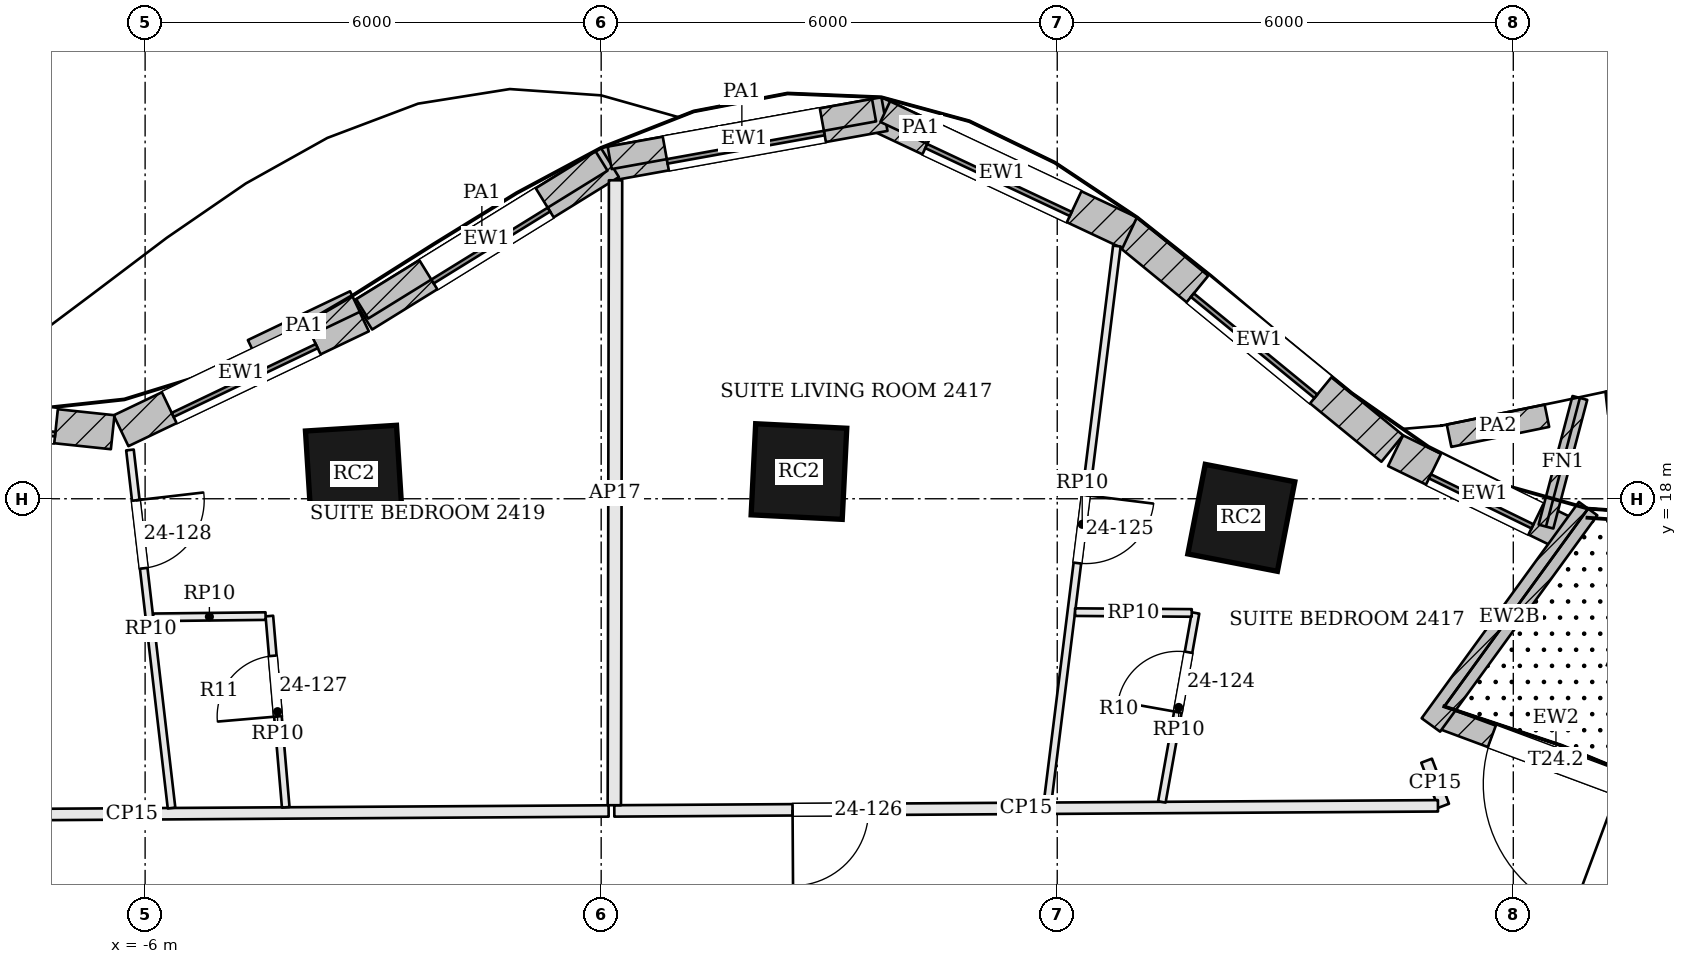
"""IFC4 building model, lengths in metres.
Left out: names, types, materials, properties, quantities, classifications, styles, units other than length and angle.
Written with IfcOpenShell. Run it as: python <this file> out.ifc"""

import sys

from ifc_helpers import new_model, si_unit, direction, frame, frame_2d, origin, origin_2d, place, context, subcontext, project, spatial, rectangle, extrude, element, fill, save


model = new_model("IFC4")
c1 = context("Model", 3, precision=1e-05, world=origin(), true_north=direction((0.0, 1.0)))
c2 = subcontext(c1, "Body", "Model", "MODEL_VIEW")
j1 = project(units=[si_unit("LENGTHUNIT", "METRE"), si_unit("PLANEANGLEUNIT", "RADIAN")], contexts=[c1])
p1 = place(None, origin())
s1 = spatial("IfcSite", under=j1, at=p1, CompositionType="ELEMENT")
p2 = place(p1, origin())
s2 = spatial("IfcBuilding", under=s1, at=p2, CompositionType="ELEMENT")
p3 = place(p2, frame((0.0, 0.0, 103.2)))
s3 = spatial("IfcBuildingStorey", under=s2, at=p3, CompositionType="ELEMENT", Elevation=103.2)
for number, where, z_axis, x_axis in (
    (1, (8.422, 17.749, 0.0), (0.0, 0.0, 1.0), (-0.982, 0.191, 0.0)),
    (2, (2.602, 18.358, 0.0), (0.0, 0.0, 1.0), (-0.999, 0.05, 0.0)),
    (3, (-3.254, 18.33, 0.0), (0.0, 0.0, 1.0), (-0.998, -0.063, 0.0)),
):
    element("IfcColumn", number, at=place(p3, frame(where, z_axis=z_axis, x_axis=x_axis)), inside=s3, PredefinedType="COLUMN", context=c2, shape_type="SweptSolid", body=[
        extrude(rectangle(XDim=1.2, YDim=1.2, at=origin_2d()), origin(), (0.0, 0.0, 1.0), 3.6),
    ])
p4 = place(p3, frame((14.083, 13.994, 0.0), z_axis=(0.0, 0.0, 1.0), x_axis=(-0.937240711156, 0.348683021312, 0.0)))
e4 = element("IfcWall", 4, at=p4, inside=s3, PredefinedType="SOLIDWALL", context=c2, shape_type="SweptSolid", body=[
    extrude(rectangle(XDim=3.247, YDim=0.3, at=frame_2d((1.624, 0.0))), origin(), (0.0, 0.0, 1.0), 3.05),
])
p5 = place(p4, frame((0.723, 0.0, 0.0)))
e5 = element("IfcOpeningElement", 5, at=p5, cuts=e4, PredefinedType="OPENING", context=c2, shape_type="SweptSolid", body=[
    extrude(rectangle(XDim=1.8, YDim=2.4, at=frame_2d((0.9, 1.2))), frame((0.0, 0.16, 0.0), z_axis=(0.0, -1.0, 0.0), x_axis=(1.0, 0.0, 0.0)), (0.0, 0.0, 1.0), 0.32),
])
p6 = place(p3, frame((12.797, 17.488, 0.0), z_axis=(0.0, 0.0, 1.0), x_axis=(-0.898632684134, 0.43870183383, 0.0)))
e6 = element("IfcWall", 6, at=p6, inside=s3, PredefinedType="SOLIDWALL", context=c2, shape_type="SweptSolid", body=[
    extrude(rectangle(XDim=2.611, YDim=0.45, at=frame_2d((1.305, 0.0))), origin(), (0.0, 0.0, 1.0), 3.4),
])
p7 = place(p6, frame((0.555, 0.0, 0.9)))
e7 = element("IfcOpeningElement", 7, at=p7, cuts=e6, PredefinedType="OPENING", context=c2, shape_type="SweptSolid", body=[
    extrude(rectangle(XDim=1.5, YDim=2.0, at=frame_2d((0.75, 1.0))), frame((0.0, 0.235, 0.0), z_axis=(0.0, -1.0, 0.0), x_axis=(1.0, 0.0, 0.0)), (0.0, 0.0, 1.0), 0.47),
])
p8 = place(p3, frame((10.407, 18.661, 0.0), z_axis=(0.0, 0.0, 1.0), x_axis=(-0.773702458947, 0.633549133864, 0.0)))
e8 = element("IfcWall", 8, at=p8, inside=s3, PredefinedType="SOLIDWALL", context=c2, shape_type="SweptSolid", body=[
    extrude(rectangle(XDim=4.526, YDim=0.45, at=frame_2d((2.263, 0.0))), origin(), (0.0, 0.0, 1.0), 3.4),
])
p9 = place(p8, frame((1.213, 0.0, 0.9)))
e9 = element("IfcOpeningElement", 9, at=p9, cuts=e8, PredefinedType="OPENING", context=c2, shape_type="SweptSolid", body=[
    extrude(rectangle(XDim=2.1, YDim=2.0, at=frame_2d((1.05, 1.0))), frame((0.0, 0.235, 0.0), z_axis=(0.0, -1.0, 0.0), x_axis=(1.0, 0.0, 0.0)), (0.0, 0.0, 1.0), 0.47),
])
p10 = place(p3, frame((6.953, 21.499, 0.0), z_axis=(0.0, 0.0, 1.0), x_axis=(-0.905034581957, 0.425337989676, 0.0)))
e10 = element("IfcWall", 10, at=p10, inside=s3, PredefinedType="SOLIDWALL", context=c2, shape_type="SweptSolid", body=[
    extrude(rectangle(XDim=3.714, YDim=0.45, at=frame_2d((1.857, 0.0))), origin(), (0.0, 0.0, 1.0), 3.4),
])
p11 = place(p10, frame((0.807, 0.0, 0.9)))
e11 = element("IfcOpeningElement", 11, at=p11, cuts=e10, PredefinedType="OPENING", context=c2, shape_type="SweptSolid", body=[
    extrude(rectangle(XDim=2.1, YDim=2.0, at=frame_2d((1.05, 1.0))), frame((0.0, 0.235, 0.0), z_axis=(0.0, -1.0, 0.0), x_axis=(1.0, 0.0, 0.0)), (0.0, 0.0, 1.0), 0.47),
])
p12 = place(p3, frame((3.727, 23.061, 0.0), z_axis=(0.0, 0.0, 1.0), x_axis=(-0.984119180424, -0.177508982087, 0.0)))
e12 = element("IfcWall", 12, at=p12, inside=s3, PredefinedType="SOLIDWALL", context=c2, shape_type="SweptSolid", body=[
    extrude(rectangle(XDim=3.747, YDim=0.45, at=frame_2d((1.873, 0.0))), origin(), (0.0, 0.0, 1.0), 3.4),
])
p13 = place(p12, frame((0.823, 0.0, 0.9)))
e13 = element("IfcOpeningElement", 13, at=p13, cuts=e12, PredefinedType="OPENING", context=c2, shape_type="SweptSolid", body=[
    extrude(rectangle(XDim=2.1, YDim=2.0, at=frame_2d((1.05, 1.0))), frame((0.0, 0.235, 0.0), z_axis=(0.0, -1.0, 0.0), x_axis=(1.0, 0.0, 0.0)), (0.0, 0.0, 1.0), 0.47),
])
p14 = place(p3, frame((0.115, 22.424, 0.0), z_axis=(0.0, 0.0, 1.0), x_axis=(-0.8506970368, -0.525656305564, 0.0)))
e14 = element("IfcWall", 14, at=p14, inside=s3, PredefinedType="SOLIDWALL", context=c2, shape_type="SweptSolid", body=[
    extrude(rectangle(XDim=3.816, YDim=0.45, at=frame_2d((1.908, 0.0))), origin(), (0.0, 0.0, 1.0), 3.4),
])
p15 = place(p14, frame((1.008, 0.0, 0.9)))
e15 = element("IfcOpeningElement", 15, at=p15, cuts=e14, PredefinedType="OPENING", context=c2, shape_type="SweptSolid", body=[
    extrude(rectangle(XDim=1.8, YDim=2.0, at=frame_2d((0.9, 1.0))), frame((0.0, 0.235, 0.0), z_axis=(0.0, -1.0, 0.0), x_axis=(1.0, 0.0, 0.0)), (0.0, 0.0, 1.0), 0.47),
])
p16 = place(p3, frame((-3.154, 20.406, 0.0), z_axis=(0.0, 0.0, 1.0), x_axis=(-0.902333313, -0.431038968367, 0.0)))
e16 = element("IfcWall", 16, at=p16, inside=s3, PredefinedType="SOLIDWALL", context=c2, shape_type="SweptSolid", body=[
    extrude(rectangle(XDim=3.505, YDim=0.45, at=frame_2d((1.753, 0.0))), origin(), (0.0, 0.0, 1.0), 3.4),
])
p17 = place(p16, frame((0.703, 0.0, 0.9)))
e17 = element("IfcOpeningElement", 17, at=p17, cuts=e16, PredefinedType="OPENING", context=c2, shape_type="SweptSolid", body=[
    extrude(rectangle(XDim=2.1, YDim=2.0, at=frame_2d((1.05, 1.0))), frame((0.0, 0.235, 0.0), z_axis=(0.0, -1.0, 0.0), x_axis=(1.0, 0.0, 0.0)), (0.0, 0.0, 1.0), 0.47),
])
p18 = place(p3, frame((-6.427, 18.875, 0.0), z_axis=(0.0, 0.0, 1.0), x_axis=(-0.994433468803, 0.10536638992, 0.0)))
e18 = element("IfcWall", 18, at=p18, inside=s3, PredefinedType="SOLIDWALL", context=c2, shape_type="SweptSolid", body=[
    extrude(rectangle(XDim=3.598, YDim=0.45, at=frame_2d((1.799, 0.0))), origin(), (0.0, 0.0, 1.0), 3.4),
])
p19 = place(p18, frame((0.749, 0.0, 0.9)))
e19 = element("IfcOpeningElement", 19, at=p19, cuts=e18, PredefinedType="OPENING", context=c2, shape_type="SweptSolid", body=[
    extrude(rectangle(XDim=2.1, YDim=2.0, at=frame_2d((1.05, 1.0))), frame((0.0, 0.235, 0.0), z_axis=(0.0, -1.0, 0.0), x_axis=(1.0, 0.0, 0.0)), (0.0, 0.0, 1.0), 0.47),
])
p20 = place(p3, frame((12.43, 17.634, 0.0), z_axis=(0.0, 0.0, 1.0), x_axis=(0.254987624184, 0.966944316656, 0.0)))
e20 = element("IfcWall", 20, at=p20, inside=s3, PredefinedType="SOLIDWALL", context=c2, shape_type="SweptSolid", body=[
    extrude(rectangle(XDim=1.75, YDim=0.2, at=frame_2d((0.875, 0.0))), origin(), (0.0, 0.0, 1.0), 3.4),
])
p21 = place(p3, frame((12.984, 17.87, 0.0), z_axis=(0.0, 0.0, 1.0), x_axis=(-0.587940596791, -0.8089041072, 0.0)))
e21 = element("IfcWall", 21, at=p21, inside=s3, PredefinedType="SOLIDWALL", context=c2, shape_type="SweptSolid", body=[
    extrude(rectangle(XDim=3.518, YDim=0.3, at=frame_2d((1.759, 0.0))), origin(), (0.0, 0.0, 1.0), 2.954),
])
p22 = place(p3, frame((11.155, 18.829, 0.0), z_axis=(0.0, 0.0, 1.0), x_axis=(0.97969170857, 0.200509740809, 0.0)))
e22 = element("IfcWall", 22, at=p22, inside=s3, PredefinedType="PARAPET", context=c2, shape_type="SweptSolid", body=[
    extrude(rectangle(XDim=1.314, YDim=0.3, at=frame_2d((0.657, 0.0))), origin(), (0.0, 0.0, 1.0), 1.1),
])
p23 = place(p3, frame((13.229, 19.259, 0.0), z_axis=(0.0, 0.0, 1.0), x_axis=(0.993648609004, 0.112527515859, 0.0)))
e23 = element("IfcWall", 23, at=p23, inside=s3, PredefinedType="PARAPET", context=c2, shape_type="SweptSolid", body=[
    extrude(rectangle(XDim=3.426, YDim=0.3, at=frame_2d((1.713, 0.0))), origin(), (0.0, 0.0, 1.0), 1.1),
])
p24 = place(p3, frame((4.667, 22.656, 3.6), z_axis=(0.0, 0.0, 1.0), x_axis=(-0.905050240273, 0.425304670304, 0.0)))
e24 = element("IfcWall", 24, at=p24, inside=s3, PredefinedType="PARAPET", context=c2, shape_type="SweptSolid", body=[
    extrude(rectangle(XDim=1.027, YDim=0.3, at=frame_2d((0.513, 0.0))), origin(), (0.0, 0.0, 1.0), 1.1),
])
p25 = place(p3, frame((3.59, 23.112, 3.6), z_axis=(0.0, 0.0, 1.0), x_axis=(-0.984124248147, -0.177480884064, 0.0)))
e25 = element("IfcWall", 25, at=p25, inside=s3, PredefinedType="PARAPET", context=c2, shape_type="SweptSolid", body=[
    extrude(rectangle(XDim=3.534, YDim=0.3, at=frame_2d((1.767, 0.0))), origin(), (0.0, 0.0, 1.0), 1.1),
])
p26 = place(p3, frame((0.005, 22.444, 3.6), z_axis=(0.0, 0.0, 1.0), x_axis=(-0.850710394144, -0.525634688063, 0.0)))
e26 = element("IfcWall", 26, at=p26, inside=s3, PredefinedType="PARAPET", context=c2, shape_type="SweptSolid", body=[
    extrude(rectangle(XDim=3.702, YDim=0.3, at=frame_2d((1.851, 0.0))), origin(), (0.0, 0.0, 1.0), 1.1),
])
p27 = place(p3, frame((-3.239, 20.594, 3.6), z_axis=(0.0, 0.0, 1.0), x_axis=(-0.902344893923, -0.431014724123, 0.0)))
e27 = element("IfcWall", 27, at=p27, inside=s3, PredefinedType="PARAPET", context=c2, shape_type="SweptSolid", body=[
    extrude(rectangle(XDim=1.49, YDim=0.3, at=frame_2d((0.745, 0.0))), origin(), (0.0, 0.0, 1.0), 1.1),
])
p28 = place(p3, frame((10.859, 14.554, 0.0), z_axis=(0.0, 0.0, 1.0), x_axis=(0.353864786713, -0.93529659078, 0.0)))
e28 = element("IfcWall", 28, at=p28, inside=s3, PredefinedType="PARTITIONING", context=c2, shape_type="SweptSolid", body=[
    extrude(rectangle(XDim=0.634, YDim=0.15, at=frame_2d((0.317, 0.0))), origin(), (0.0, 0.0, 1.0), 2.784),
])
p29 = place(p3, frame((11.009, 13.96, 0.0), z_axis=(0.0, 0.0, 1.0), x_axis=(-0.999980665956, -0.006218336874, 0.0)))
e29 = element("IfcWall", 29, at=p29, inside=s3, PredefinedType="PARTITIONING", context=c2, shape_type="SweptSolid", body=[
    extrude(rectangle(XDim=10.836, YDim=0.15, at=frame_2d((5.418, 0.0))), origin(), (0.0, 0.0, 1.0), 2.784),
])
p30 = place(p29, frame((7.491, 0.0, 0.0)))
e30 = element("IfcOpeningElement", 30, at=p30, cuts=e29, PredefinedType="OPENING", context=c2, shape_type="SweptSolid", body=[
    extrude(rectangle(XDim=1.0, YDim=2.1, at=frame_2d((0.5, 1.05))), frame((0.0, 0.085, 0.0), z_axis=(0.0, -1.0, 0.0), x_axis=(1.0, 0.0, 0.0)), (0.0, 0.0, 1.0), 0.17),
])
p31 = place(p3, frame((0.189, 22.19, 0.0), z_axis=(0.0, 0.0, 1.0), x_axis=(-0.00195984895, -0.999998079494, 0.0)))
e31 = element("IfcWall", 31, at=p31, inside=s3, PredefinedType="PARTITIONING", context=c2, shape_type="SweptSolid", body=[
    extrude(rectangle(XDim=8.222, YDim=0.175, at=frame_2d((4.111, 0.0))), origin(), (0.0, 0.0, 1.0), 2.784),
])
p32 = place(p3, frame((0.098, 13.893, 0.0), z_axis=(0.0, 0.0, 1.0), x_axis=(-0.999980712681, -0.006210818468, 0.0)))
e32 = element("IfcWall", 32, at=p32, inside=s3, PredefinedType="PARTITIONING", context=c2, shape_type="SweptSolid", body=[
    extrude(rectangle(XDim=12.54, YDim=0.15, at=frame_2d((6.27, 0.0))), origin(), (0.0, 0.0, 1.0), 2.784),
])
p33 = place(p32, frame((8.678, 0.0, 0.0)))
e33 = element("IfcOpeningElement", 33, at=p33, cuts=e32, PredefinedType="OPENING", context=c2, shape_type="SweptSolid", body=[
    extrude(rectangle(XDim=1.0, YDim=2.1, at=frame_2d((0.5, 1.05))), frame((0.0, 0.085, 0.0), z_axis=(0.0, -1.0, 0.0), x_axis=(1.0, 0.0, 0.0)), (0.0, 0.0, 1.0), 0.17),
])
p34 = place(p3, frame((6.784, 21.325, 0.0), z_axis=(0.0, 0.0, 1.0), x_axis=(-0.123554166571, -0.992337829533, 0.0)))
e34 = element("IfcWall", 34, at=p34, inside=s3, PredefinedType="PARTITIONING", context=c2, shape_type="SweptSolid", body=[
    extrude(rectangle(XDim=7.378, YDim=0.1, at=frame_2d((3.689, 0.0))), origin(), (0.0, 0.0, 1.0), 2.784),
])
p35 = place(p34, frame((3.303, 0.0, 0.0)))
e35 = element("IfcOpeningElement", 35, at=p35, cuts=e34, PredefinedType="OPENING", context=c2, shape_type="SweptSolid", body=[
    extrude(rectangle(XDim=0.9, YDim=2.4, at=frame_2d((0.45, 1.2))), frame((0.0, 0.06, 0.0), z_axis=(0.0, -1.0, 0.0), x_axis=(1.0, 0.0, 0.0)), (0.0, 0.0, 1.0), 0.12),
])
p36 = place(p3, frame((7.377, 14.012, 0.0), z_axis=(0.0, 0.0, 1.0), x_axis=(0.175395736949, 0.984498011913, 0.0)))
e36 = element("IfcWall", 36, at=p36, inside=s3, PredefinedType="PARTITIONING", context=c2, shape_type="SweptSolid", body=[
    extrude(rectangle(XDim=2.525, YDim=0.1, at=frame_2d((1.262, 0.0))), origin(), (0.0, 0.0, 1.0), 2.784),
])
p37 = place(p36, frame((1.2, 0.0, 0.0)))
e37 = element("IfcOpeningElement", 37, at=p37, cuts=e36, PredefinedType="OPENING", context=c2, shape_type="SweptSolid", body=[
    extrude(rectangle(XDim=0.8, YDim=2.1, at=frame_2d((0.4, 1.05))), frame((0.0, 0.06, 0.0), z_axis=(0.0, -1.0, 0.0), x_axis=(1.0, 0.0, 0.0)), (0.0, 0.0, 1.0), 0.12),
])
p38 = place(p3, frame((7.77, 16.498, 0.0), z_axis=(0.0, 0.0, 1.0), x_axis=(-0.999976611371, 0.006839350133, 0.0)))
e38 = element("IfcWall", 38, at=p38, inside=s3, PredefinedType="PARTITIONING", context=c2, shape_type="SweptSolid", body=[
    extrude(rectangle(XDim=1.535, YDim=0.1, at=frame_2d((0.768, 0.0))), origin(), (0.0, 0.0, 1.0), 2.784),
])
p39 = place(p3, frame((-6.199, 18.642, 0.0), z_axis=(0.0, 0.0, 1.0), x_axis=(0.115374456255, -0.993322070048, 0.0)))
e39 = element("IfcWall", 39, at=p39, inside=s3, PredefinedType="PARTITIONING", context=c2, shape_type="SweptSolid", body=[
    extrude(rectangle(XDim=4.742, YDim=0.1, at=frame_2d((2.371, 0.0))), origin(), (0.0, 0.0, 1.0), 2.784),
])
p40 = place(p39, frame((0.667, 0.0, 0.0)))
e40 = element("IfcOpeningElement", 40, at=p40, cuts=e39, PredefinedType="OPENING", context=c2, shape_type="SweptSolid", body=[
    extrude(rectangle(XDim=0.9, YDim=2.4, at=frame_2d((0.45, 1.2))), frame((0.0, 0.06, 0.0), z_axis=(0.0, -1.0, 0.0), x_axis=(1.0, 0.0, 0.0)), (0.0, 0.0, 1.0), 0.12),
])
p41 = place(p3, frame((-4.15, 13.941, 0.0), z_axis=(0.0, 0.0, 1.0), x_axis=(-0.085277735772, 0.996357218964, 0.0)))
e41 = element("IfcWall", 41, at=p41, inside=s3, PredefinedType="PARTITIONING", context=c2, shape_type="SweptSolid", body=[
    extrude(rectangle(XDim=2.525, YDim=0.1, at=frame_2d((1.263, 0.0))), origin(), (0.0, 0.0, 1.0), 2.784),
])
p42 = place(p41, frame((1.2, 0.0, 0.0)))
e42 = element("IfcOpeningElement", 42, at=p42, cuts=e41, PredefinedType="OPENING", context=c2, shape_type="SweptSolid", body=[
    extrude(rectangle(XDim=0.8, YDim=2.1, at=frame_2d((0.4, 1.05))), frame((0.0, 0.06, 0.0), z_axis=(0.0, -1.0, 0.0), x_axis=(1.0, 0.0, 0.0)), (0.0, 0.0, 1.0), 0.12),
])
p43 = place(p3, frame((-4.415, 16.456, 0.0), z_axis=(0.0, 0.0, 1.0), x_axis=(-0.999938785905, -0.011064557994, 0.0)))
e43 = element("IfcWall", 43, at=p43, inside=s3, PredefinedType="PARTITIONING", context=c2, shape_type="SweptSolid", body=[
    extrude(rectangle(XDim=1.478, YDim=0.1, at=frame_2d((0.739, 0.0))), origin(), (0.0, 0.0, 1.0), 2.784),
])
p44 = place(p5, origin())
e44 = element("IfcDoor", 44, at=p44, inside=s3, OperationType="DOUBLE_DOOR_DOUBLE_SWING", PredefinedType="DOOR", context=c2, shape_type="SweptSolid", body=[
    extrude(rectangle(XDim=1.8, YDim=2.4, at=frame_2d((0.9, 1.2))), frame((0.0, 0.025, 0.0), z_axis=(0.0, -1.0, 0.0), x_axis=(1.0, 0.0, 0.0)), (0.0, 0.0, 1.0), 0.05),
])
fill(e5, e44)
p45 = place(p7, origin())
e45 = element("IfcWindow", 45, at=p45, inside=s3, PartitioningType="SINGLE_PANEL", PredefinedType="WINDOW", context=c2, shape_type="SweptSolid", body=[
    extrude(rectangle(XDim=1.5, YDim=2.0, at=frame_2d((0.75, 1.0))), frame((0.0, 0.135, 0.0), z_axis=(0.0, -1.0, 0.0), x_axis=(1.0, 0.0, 0.0)), (0.0, 0.0, 1.0), 0.06),
])
fill(e7, e45)
p46 = place(p9, origin())
e46 = element("IfcWindow", 46, at=p46, inside=s3, PartitioningType="SINGLE_PANEL", PredefinedType="WINDOW", context=c2, shape_type="SweptSolid", body=[
    extrude(rectangle(XDim=2.1, YDim=2.0, at=frame_2d((1.05, 1.0))), frame((0.0, 0.135, 0.0), z_axis=(0.0, -1.0, 0.0), x_axis=(1.0, 0.0, 0.0)), (0.0, 0.0, 1.0), 0.06),
])
fill(e9, e46)
p47 = place(p11, origin())
e47 = element("IfcWindow", 47, at=p47, inside=s3, PartitioningType="SINGLE_PANEL", PredefinedType="WINDOW", context=c2, shape_type="SweptSolid", body=[
    extrude(rectangle(XDim=2.1, YDim=2.0, at=frame_2d((1.05, 1.0))), frame((0.0, 0.135, 0.0), z_axis=(0.0, -1.0, 0.0), x_axis=(1.0, 0.0, 0.0)), (0.0, 0.0, 1.0), 0.06),
])
fill(e11, e47)
p48 = place(p13, origin())
e48 = element("IfcWindow", 48, at=p48, inside=s3, PartitioningType="SINGLE_PANEL", PredefinedType="WINDOW", context=c2, shape_type="SweptSolid", body=[
    extrude(rectangle(XDim=2.1, YDim=2.0, at=frame_2d((1.05, 1.0))), frame((0.0, 0.135, 0.0), z_axis=(0.0, -1.0, 0.0), x_axis=(1.0, 0.0, 0.0)), (0.0, 0.0, 1.0), 0.06),
])
fill(e13, e48)
p49 = place(p15, origin())
e49 = element("IfcWindow", 49, at=p49, inside=s3, PartitioningType="SINGLE_PANEL", PredefinedType="WINDOW", context=c2, shape_type="SweptSolid", body=[
    extrude(rectangle(XDim=1.8, YDim=2.0, at=frame_2d((0.9, 1.0))), frame((0.0, 0.135, 0.0), z_axis=(0.0, -1.0, 0.0), x_axis=(1.0, 0.0, 0.0)), (0.0, 0.0, 1.0), 0.06),
])
fill(e15, e49)
p50 = place(p17, origin())
e50 = element("IfcWindow", 50, at=p50, inside=s3, PartitioningType="SINGLE_PANEL", PredefinedType="WINDOW", context=c2, shape_type="SweptSolid", body=[
    extrude(rectangle(XDim=2.1, YDim=2.0, at=frame_2d((1.05, 1.0))), frame((0.0, 0.135, 0.0), z_axis=(0.0, -1.0, 0.0), x_axis=(1.0, 0.0, 0.0)), (0.0, 0.0, 1.0), 0.06),
])
fill(e17, e50)
p51 = place(p19, origin())
e51 = element("IfcWindow", 51, at=p51, inside=s3, PartitioningType="SINGLE_PANEL", PredefinedType="WINDOW", context=c2, shape_type="SweptSolid", body=[
    extrude(rectangle(XDim=2.1, YDim=2.0, at=frame_2d((1.05, 1.0))), frame((0.0, 0.135, 0.0), z_axis=(0.0, -1.0, 0.0), x_axis=(1.0, 0.0, 0.0)), (0.0, 0.0, 1.0), 0.06),
])
fill(e19, e51)
p52 = place(p37, origin())
e52 = element("IfcDoor", 52, at=p52, inside=s3, OperationType="SINGLE_SWING_LEFT", PredefinedType="DOOR", context=c2, shape_type="SweptSolid", body=[
    extrude(rectangle(XDim=0.8, YDim=2.1, at=frame_2d((0.4, 1.05))), frame((0.0, 0.025, 0.0), z_axis=(0.0, -1.0, 0.0), x_axis=(1.0, 0.0, 0.0)), (0.0, 0.0, 1.0), 0.05),
])
fill(e37, e52)
p53 = place(p35, origin())
e53 = element("IfcDoor", 53, at=p53, inside=s3, OperationType="SINGLE_SWING_LEFT", PredefinedType="DOOR", context=c2, shape_type="SweptSolid", body=[
    extrude(rectangle(XDim=0.9, YDim=2.4, at=frame_2d((0.45, 1.2))), frame((0.0, 0.025, 0.0), z_axis=(0.0, -1.0, 0.0), x_axis=(1.0, 0.0, 0.0)), (0.0, 0.0, 1.0), 0.05),
])
fill(e35, e53)
p54 = place(p30, origin())
e54 = element("IfcDoor", 54, at=p54, inside=s3, OperationType="SINGLE_SWING_RIGHT", PredefinedType="DOOR", context=c2, shape_type="SweptSolid", body=[
    extrude(rectangle(XDim=1.0, YDim=2.1, at=frame_2d((0.5, 1.05))), frame((0.0, 0.025, 0.0), z_axis=(0.0, -1.0, 0.0), x_axis=(1.0, 0.0, 0.0)), (0.0, 0.0, 1.0), 0.05),
])
fill(e30, e54)
p55 = place(p42, origin())
e55 = element("IfcDoor", 55, at=p55, inside=s3, OperationType="SINGLE_SWING_LEFT", PredefinedType="DOOR", context=c2, shape_type="SweptSolid", body=[
    extrude(rectangle(XDim=0.8, YDim=2.1, at=frame_2d((0.4, 1.05))), frame((0.0, 0.025, 0.0), z_axis=(0.0, -1.0, 0.0), x_axis=(1.0, 0.0, 0.0)), (0.0, 0.0, 1.0), 0.05),
])
fill(e42, e55)
p56 = place(p40, origin())
e56 = element("IfcDoor", 56, at=p56, inside=s3, OperationType="SINGLE_SWING_LEFT", PredefinedType="DOOR", context=c2, shape_type="SweptSolid", body=[
    extrude(rectangle(XDim=0.9, YDim=2.4, at=frame_2d((0.45, 1.2))), frame((0.0, 0.025, 0.0), z_axis=(0.0, -1.0, 0.0), x_axis=(1.0, 0.0, 0.0)), (0.0, 0.0, 1.0), 0.05),
])
fill(e40, e56)
save(model, sys.argv[1])
